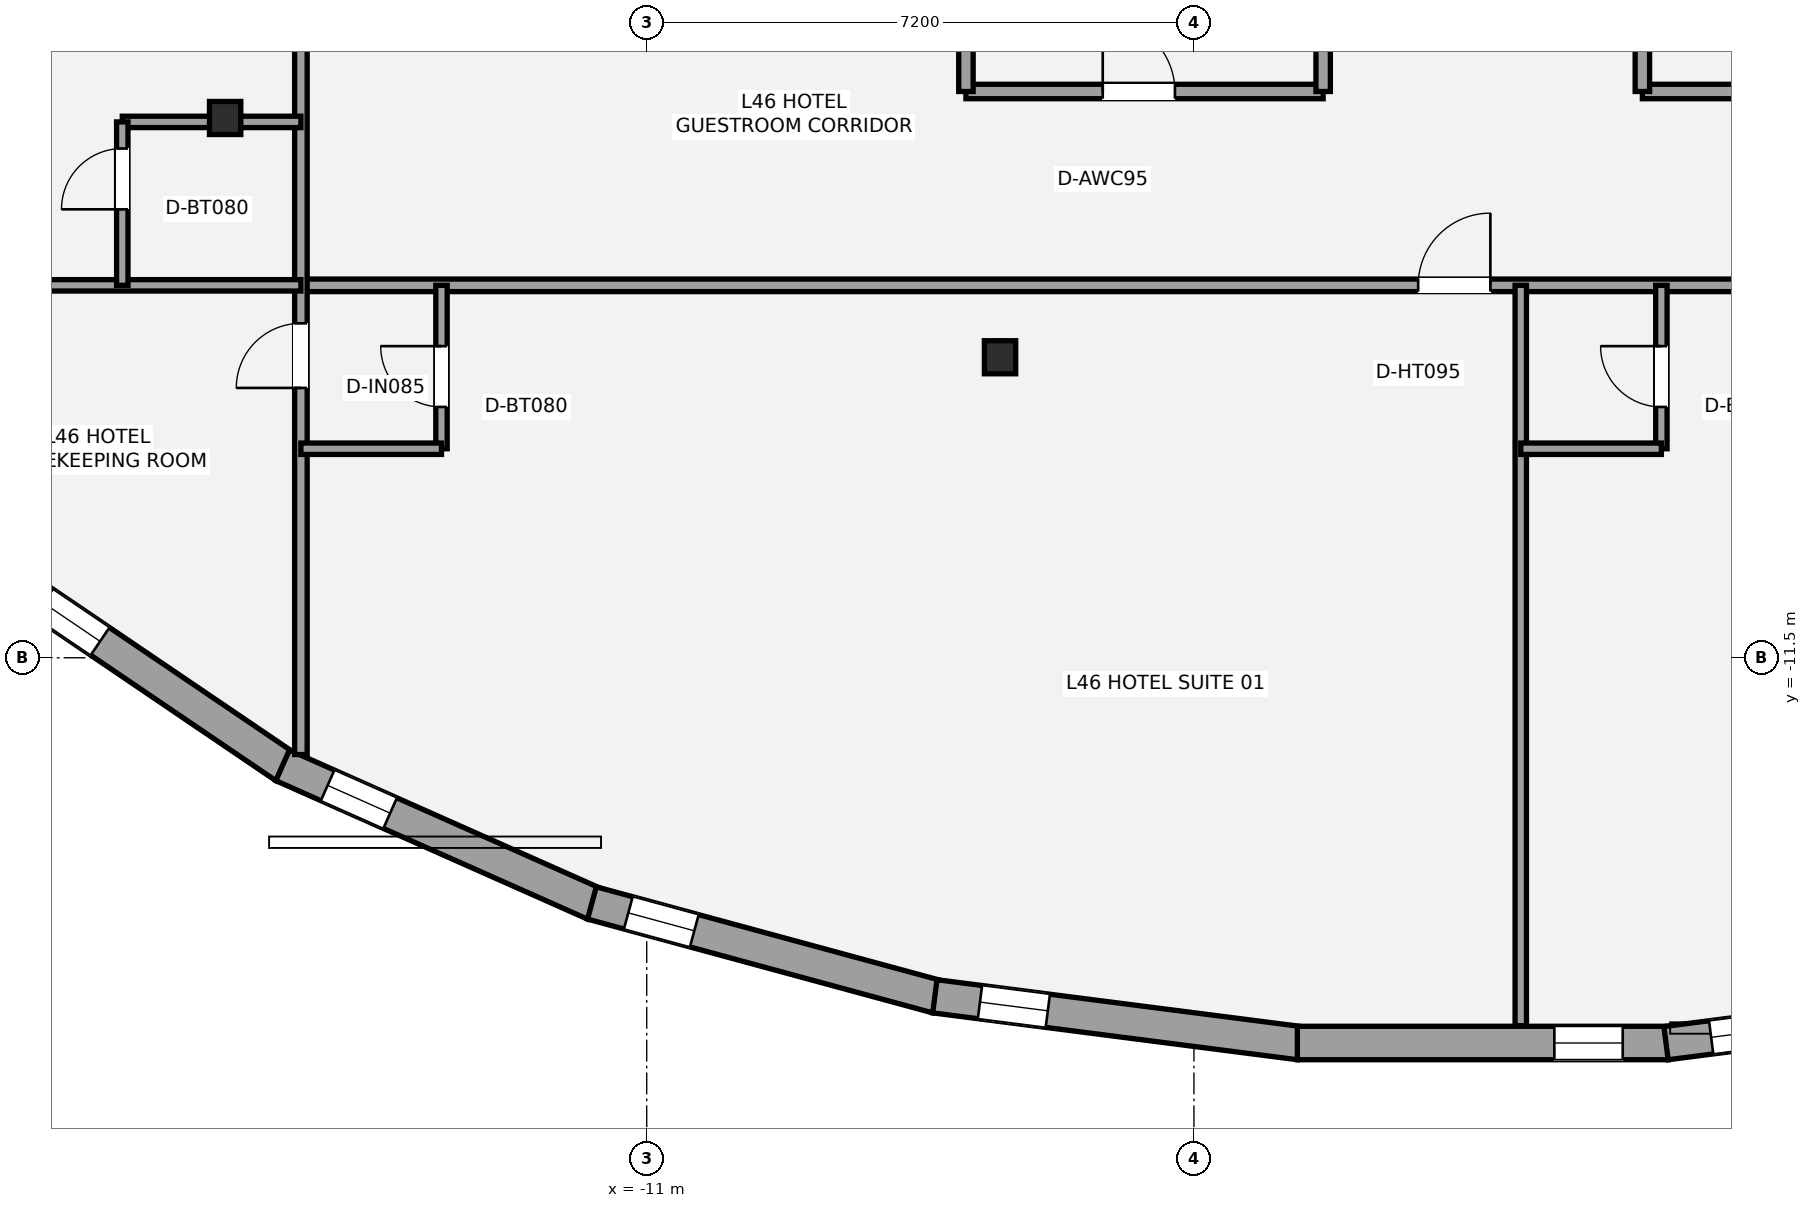
"""IFC4 building model, lengths in metres.
Left out: names, types, materials, properties, quantities, classifications, styles, units other than length and angle.
Written with IfcOpenShell. Run it as: python <this file> out.ifc"""

import sys

from ifc_helpers import new_model, si_unit, direction, frame, frame_2d, origin, origin_2d, place, context, subcontext, project, spatial, rectangle, i_section, extrude, element, fill, save


model = new_model("IFC4")
c1 = context("Model", 3, precision=1e-05, world=origin(), true_north=direction((0.0, 1.0)))
c2 = subcontext(c1, "Body", "Model", "MODEL_VIEW")
j1 = project(units=[si_unit("LENGTHUNIT", "METRE"), si_unit("PLANEANGLEUNIT", "RADIAN")], contexts=[c1])
p1 = place(None, origin())
s1 = spatial("IfcSite", under=j1, at=p1, CompositionType="ELEMENT")
p2 = place(p1, origin())
s2 = spatial("IfcBuilding", under=s1, at=p2, CompositionType="ELEMENT")
p3 = place(p2, frame((0.0, 0.0, 169.4)))
s3 = spatial("IfcBuildingStorey", under=s2, at=p3, CompositionType="ELEMENT", Elevation=169.4)
for number, where, z_axis, x_axis in (
    (1, (-16.547, -4.398, 0.0), (0.0, 0.0, 1.0), (1.0, 0.0, 0.0)),
    (2, (-6.351, -7.546, 0.0), (0.0, 0.0, 1.0), (1.0, 0.0, 0.0)),
):
    element("IfcColumn", number, at=place(p3, frame(where, z_axis=z_axis, x_axis=x_axis)), inside=s3, PredefinedType="COLUMN", context=c2, shape_type="SweptSolid", body=[
        extrude(i_section(OverallWidth=0.412, OverallDepth=0.435, WebThickness=0.036, FlangeThickness=0.057, at=origin_2d()), origin(), (0.0, 0.0, 1.0), 3.2),
    ])
p4 = place(p3, frame((-15.757, -12.935, 0.0), z_axis=(0.0, 0.0, 1.0), x_axis=(-0.827760762475, 0.561081206338, 0.0)))
e3 = element("IfcWall", 3, at=p4, inside=s3, PredefinedType="STANDARD", context=c2, shape_type="SweptSolid", body=[
    extrude(rectangle(XDim=4.192, YDim=0.44, at=frame_2d((2.096, 0.0))), origin(), (0.0, 0.0, 1.0), 2.319),
])
p5 = place(p4, frame((2.942, 0.0, 0.58)))
e4 = element("IfcOpeningElement", 4, at=p5, cuts=e3, PredefinedType="OPENING", context=c2, shape_type="SweptSolid", body=[
    extrude(rectangle(XDim=0.9, YDim=1.35, at=frame_2d((0.45, 0.675))), frame((0.0, 0.23, 0.0), z_axis=(0.0, -1.0, 0.0), x_axis=(1.0, 0.0, 0.0)), (0.0, 0.0, 1.0), 0.46),
])
p6 = place(p3, frame((-11.69, -14.737, 0.0), z_axis=(0.0, 0.0, 1.0), x_axis=(-0.913907994914, 0.405921392431, 0.0)))
e5 = element("IfcWall", 5, at=p6, inside=s3, PredefinedType="STANDARD", context=c2, shape_type="SweptSolid", body=[
    extrude(rectangle(XDim=4.487, YDim=0.44, at=frame_2d((2.244, 0.0))), origin(), (0.0, 0.0, 1.0), 2.315),
])
p7 = place(p6, frame((2.939, 0.0, 0.58)))
e6 = element("IfcOpeningElement", 6, at=p7, cuts=e5, PredefinedType="OPENING", context=c2, shape_type="SweptSolid", body=[
    extrude(rectangle(XDim=0.9, YDim=1.35, at=frame_2d((0.45, 0.675))), frame((0.0, 0.23, 0.0), z_axis=(0.0, -1.0, 0.0), x_axis=(1.0, 0.0, 0.0)), (0.0, 0.0, 1.0), 0.46),
])
p8 = place(p3, frame((-7.179, -15.959, 0.0), z_axis=(0.0, 0.0, 1.0), x_axis=(-0.965037424263, 0.262112132058, 0.0)))
e7 = element("IfcWall", 7, at=p8, inside=s3, PredefinedType="STANDARD", context=c2, shape_type="SweptSolid", body=[
    extrude(rectangle(XDim=4.707, YDim=0.44, at=frame_2d((2.353, 0.0))), origin(), (0.0, 0.0, 1.0), 2.315),
])
p9 = place(p8, frame((3.31, 0.0, 0.58)))
e8 = element("IfcOpeningElement", 8, at=p9, cuts=e7, PredefinedType="OPENING", context=c2, shape_type="SweptSolid", body=[
    extrude(rectangle(XDim=0.9, YDim=1.35, at=frame_2d((0.45, 0.675))), frame((0.0, 0.23, 0.0), z_axis=(0.0, -1.0, 0.0), x_axis=(1.0, 0.0, 0.0)), (0.0, 0.0, 1.0), 0.46),
])
p10 = place(p3, frame((-2.411, -16.57, 0.0), z_axis=(0.0, 0.0, 1.0), x_axis=(-0.991852910824, 0.127388395426, 0.0)))
e9 = element("IfcWall", 9, at=p10, inside=s3, PredefinedType="STANDARD", context=c2, shape_type="SweptSolid", body=[
    extrude(rectangle(XDim=4.837, YDim=0.44, at=frame_2d((2.418, 0.0))), origin(), (0.0, 0.0, 1.0), 2.315),
])
p11 = place(p10, frame((3.339, 0.0, 0.58)))
e10 = element("IfcOpeningElement", 10, at=p11, cuts=e9, PredefinedType="OPENING", context=c2, shape_type="SweptSolid", body=[
    extrude(rectangle(XDim=0.9, YDim=1.35, at=frame_2d((0.45, 0.675))), frame((0.0, 0.23, 0.0), z_axis=(0.0, -1.0, 0.0), x_axis=(1.0, 0.0, 0.0)), (0.0, 0.0, 1.0), 0.46),
])
p12 = place(p3, frame((2.439, -16.568, 0.0), z_axis=(0.0, 0.0, 1.0), x_axis=(-1.0, 0.0, 0.0)))
e11 = element("IfcWall", 11, at=p12, inside=s3, PredefinedType="STANDARD", context=c2, shape_type="SweptSolid", body=[
    extrude(rectangle(XDim=4.878, YDim=0.44, at=frame_2d((2.439, 0.0))), origin(), (0.0, 0.0, 1.0), 2.315),
])
p13 = place(p12, frame((0.598, 0.0, 0.58)))
e12 = element("IfcOpeningElement", 12, at=p13, cuts=e11, PredefinedType="OPENING", context=c2, shape_type="SweptSolid", body=[
    extrude(rectangle(XDim=0.9, YDim=1.35, at=frame_2d((0.45, 0.675))), frame((0.0, 0.23, 0.0), z_axis=(0.0, -1.0, 0.0), x_axis=(1.0, 0.0, 0.0)), (0.0, 0.0, 1.0), 0.46),
])
p14 = place(p3, frame((7.209, -15.954, 0.0), z_axis=(0.0, 0.0, 1.0), x_axis=(-0.991852910824, -0.127388395426, 0.0)))
e13 = element("IfcWall", 13, at=p14, inside=s3, PredefinedType="STANDARD", context=c2, shape_type="SweptSolid", body=[
    extrude(rectangle(XDim=4.837, YDim=0.44, at=frame_2d((2.418, 0.0))), origin(), (0.0, 0.0, 1.0), 2.315),
])
p15 = place(p14, frame((3.339, 0.0, 0.58)))
e14 = element("IfcOpeningElement", 14, at=p15, cuts=e13, PredefinedType="OPENING", context=c2, shape_type="SweptSolid", body=[
    extrude(rectangle(XDim=0.9, YDim=1.35, at=frame_2d((0.45, 0.675))), frame((0.0, 0.23, 0.0), z_axis=(0.0, -1.0, 0.0), x_axis=(1.0, 0.0, 0.0)), (0.0, 0.0, 1.0), 0.46),
])
p16 = place(p3, frame((-6.8, -4.05, 0.0), z_axis=(0.0, 0.0, 1.0), x_axis=(1.0, 0.0, 0.0)))
e15 = element("IfcWall", 15, at=p16, inside=s3, PredefinedType="PLUMBINGWALL", context=c2, shape_type="SweptSolid", body=[
    extrude(rectangle(XDim=4.7, YDim=0.19, at=frame_2d((2.35, 0.0))), origin(), (0.0, 0.0, 1.0), 3.02),
])
p17 = place(p16, frame((1.8, 0.0, 0.0)))
e16 = element("IfcOpeningElement", 16, at=p17, cuts=e15, PredefinedType="OPENING", context=c2, shape_type="SweptSolid", body=[
    extrude(rectangle(XDim=0.95, YDim=2.15, at=frame_2d((0.475, 1.075))), frame((0.0, 0.105, 0.0), z_axis=(0.0, -1.0, 0.0), x_axis=(1.0, 0.0, 0.0)), (0.0, 0.0, 1.0), 0.21),
])
p18 = place(p3, frame((-6.8, -4.05, 0.0), z_axis=(0.0, 0.0, 1.0), x_axis=(0.0, 1.0, 0.0)))
e17 = element("IfcWall", 17, at=p18, inside=s3, PredefinedType="PLUMBINGWALL", context=c2, shape_type="SweptSolid", body=[
    extrude(rectangle(XDim=1.9, YDim=0.19, at=frame_2d((0.95, 0.0))), origin(), (0.0, 0.0, 1.0), 2.473),
])
p19 = place(p3, frame((-2.1, -4.05, 0.0), z_axis=(0.0, 0.0, 1.0), x_axis=(0.0, 1.0, 0.0)))
e18 = element("IfcWall", 18, at=p19, inside=s3, PredefinedType="PLUMBINGWALL", context=c2, shape_type="SweptSolid", body=[
    extrude(rectangle(XDim=1.9, YDim=0.19, at=frame_2d((0.95, 0.0))), origin(), (0.0, 0.0, 1.0), 3.02),
])
p20 = place(p3, frame((2.1, -4.05, 0.0), z_axis=(0.0, 0.0, 1.0), x_axis=(1.0, 0.0, 0.0)))
e19 = element("IfcWall", 19, at=p20, inside=s3, PredefinedType="PLUMBINGWALL", context=c2, shape_type="SweptSolid", body=[
    extrude(rectangle(XDim=11.35, YDim=0.19, at=frame_2d((5.675, 0.0))), origin(), (0.0, 0.0, 1.0), 3.02),
])
p21 = place(p20, frame((5.2, 0.0, 0.0)))
e20 = element("IfcOpeningElement", 20, at=p21, cuts=e19, PredefinedType="OPENING", context=c2, shape_type="SweptSolid", body=[
    extrude(rectangle(XDim=0.9, YDim=2.1, at=frame_2d((0.45, 1.05))), frame((0.0, 0.105, 0.0), z_axis=(0.0, -1.0, 0.0), x_axis=(1.0, 0.0, 0.0)), (0.0, 0.0, 1.0), 0.21),
])
p22 = place(p3, frame((2.1, -4.05, 0.0), z_axis=(0.0, 0.0, 1.0), x_axis=(0.0, 1.0, 0.0)))
e21 = element("IfcWall", 21, at=p22, inside=s3, PredefinedType="PLUMBINGWALL", context=c2, shape_type="SweptSolid", body=[
    extrude(rectangle(XDim=1.9, YDim=0.19, at=frame_2d((0.95, 0.0))), origin(), (0.0, 0.0, 1.0), 3.02),
])
p23 = place(p3, frame((-15.55, -6.6, 0.0), z_axis=(0.0, 0.0, 1.0), x_axis=(1.0, 0.0, 0.0)))
e22 = element("IfcWall", 22, at=p23, inside=s3, PredefinedType="PARTITIONING", context=c2, shape_type="SweptSolid", body=[
    extrude(rectangle(XDim=31.65, YDim=0.165, at=frame_2d((15.825, 0.0))), origin(), (0.0, 0.0, 1.0), 2.398),
])
p24 = place(p23, frame((14.7, 0.0, 0.0)))
e23 = element("IfcOpeningElement", 23, at=p24, cuts=e22, PredefinedType="OPENING", context=c2, shape_type="SweptSolid", body=[
    extrude(rectangle(XDim=0.95, YDim=2.15, at=frame_2d((0.475, 1.075))), frame((0.0, 0.093, 0.0), z_axis=(0.0, -1.0, 0.0), x_axis=(1.0, 0.0, 0.0)), (0.0, 0.0, 1.0), 0.185),
])
p25 = place(p23, frame((30.3, 0.0, 0.0)))
e24 = element("IfcOpeningElement", 24, at=p25, cuts=e22, PredefinedType="OPENING", context=c2, shape_type="SweptSolid", body=[
    extrude(rectangle(XDim=0.95, YDim=2.15, at=frame_2d((0.475, 1.075))), frame((0.0, 0.093, 0.0), z_axis=(0.0, -1.0, 0.0), x_axis=(1.0, 0.0, 0.0)), (0.0, 0.0, 1.0), 0.185),
])
p26 = place(p3, frame((-15.55, -12.773, 0.0), z_axis=(0.0, 0.0, 1.0), x_axis=(0.0, 1.0, 0.0)))
e25 = element("IfcWall", 25, at=p26, inside=s3, PredefinedType="PARTITIONING", context=c2, shape_type="SweptSolid", body=[
    extrude(rectangle(XDim=20.323, YDim=0.165, at=frame_2d((10.162, 0.0))), origin(), (0.0, 0.0, 1.0), 2.473),
])
p27 = place(p26, frame((4.823, 0.0, 0.0)))
e26 = element("IfcOpeningElement", 26, at=p27, cuts=e25, PredefinedType="OPENING", context=c2, shape_type="SweptSolid", body=[
    extrude(rectangle(XDim=0.85, YDim=2.1, at=frame_2d((0.425, 1.05))), frame((0.0, 0.093, 0.0), z_axis=(0.0, -1.0, 0.0), x_axis=(1.0, 0.0, 0.0)), (0.0, 0.0, 1.0), 0.185),
])
p28 = place(p26, frame((9.623, 0.0, 0.0)))
e27 = element("IfcOpeningElement", 27, at=p28, cuts=e25, PredefinedType="OPENING", context=c2, shape_type="SweptSolid", body=[
    extrude(rectangle(XDim=0.95, YDim=2.15, at=frame_2d((0.475, 1.075))), frame((0.0, 0.093, 0.0), z_axis=(0.0, -1.0, 0.0), x_axis=(1.0, 0.0, 0.0)), (0.0, 0.0, 1.0), 0.185),
])
p29 = place(p26, frame((14.223, 0.0, 0.0)))
e28 = element("IfcOpeningElement", 28, at=p29, cuts=e25, PredefinedType="OPENING", context=c2, shape_type="SweptSolid", body=[
    extrude(rectangle(XDim=0.95, YDim=2.15, at=frame_2d((0.475, 1.075))), frame((0.0, 0.093, 0.0), z_axis=(0.0, -1.0, 0.0), x_axis=(1.0, 0.0, 0.0)), (0.0, 0.0, 1.0), 0.185),
])
p30 = place(p26, frame((18.973, 0.0, 0.0)))
e29 = element("IfcOpeningElement", 29, at=p30, cuts=e25, PredefinedType="OPENING", context=c2, shape_type="SweptSolid", body=[
    extrude(rectangle(XDim=0.95, YDim=2.15, at=frame_2d((0.475, 1.075))), frame((0.0, 0.093, 0.0), z_axis=(0.0, -1.0, 0.0), x_axis=(1.0, 0.0, 0.0)), (0.0, 0.0, 1.0), 0.185),
])
p31 = place(p3, frame((-22.335, -6.6, 0.0), z_axis=(0.0, 0.0, 1.0), x_axis=(1.0, 0.0, 0.0)))
e30 = element("IfcWall", 30, at=p31, inside=s3, PredefinedType="PLUMBINGWALL", context=c2, shape_type="SweptSolid", body=[
    extrude(rectangle(XDim=6.785, YDim=0.15, at=frame_2d((3.392, 0.0))), origin(), (0.0, 0.0, 1.0), 2.473),
])
p32 = place(p3, frame((0.5, -16.34, 0.0), z_axis=(0.0, 0.0, 1.0), x_axis=(0.0, 1.0, 0.0)))
e31 = element("IfcWall", 31, at=p32, inside=s3, PredefinedType="PLUMBINGWALL", context=c2, shape_type="SweptSolid", body=[
    extrude(rectangle(XDim=9.74, YDim=0.15, at=frame_2d((4.87, 0.0))), origin(), (0.0, 0.0, 1.0), 2.473),
])
p33 = place(p3, frame((-13.7, -8.75, 0.0), z_axis=(0.0, 0.0, 1.0), x_axis=(0.0, 1.0, 0.0)))
e32 = element("IfcWall", 32, at=p33, inside=s3, PredefinedType="PLUMBINGWALL", context=c2, shape_type="SweptSolid", body=[
    extrude(rectangle(XDim=2.15, YDim=0.15, at=frame_2d((1.075, 0.0))), origin(), (0.0, 0.0, 1.0), 3.02),
])
p34 = place(p33, frame((0.55, 0.0, 0.0)))
e33 = element("IfcOpeningElement", 33, at=p34, cuts=e32, PredefinedType="OPENING", context=c2, shape_type="SweptSolid", body=[
    extrude(rectangle(XDim=0.8, YDim=2.1, at=frame_2d((0.4, 1.05))), frame((0.0, 0.085, 0.0), z_axis=(0.0, -1.0, 0.0), x_axis=(1.0, 0.0, 0.0)), (0.0, 0.0, 1.0), 0.17),
])
p35 = place(p3, frame((-15.55, -8.75, 0.0), z_axis=(0.0, 0.0, 1.0), x_axis=(1.0, 0.0, 0.0)))
e34 = element("IfcWall", 34, at=p35, inside=s3, PredefinedType="PLUMBINGWALL", context=c2, shape_type="SweptSolid", body=[
    extrude(rectangle(XDim=1.85, YDim=0.15, at=frame_2d((0.925, 0.0))), origin(), (0.0, 0.0, 1.0), 2.473),
])
p36 = place(p3, frame((2.35, -8.75, 0.0), z_axis=(0.0, 0.0, 1.0), x_axis=(0.0, 1.0, 0.0)))
e35 = element("IfcWall", 35, at=p36, inside=s3, PredefinedType="PLUMBINGWALL", context=c2, shape_type="SweptSolid", body=[
    extrude(rectangle(XDim=2.15, YDim=0.15, at=frame_2d((1.075, 0.0))), origin(), (0.0, 0.0, 1.0), 2.473),
])
p37 = place(p36, frame((0.55, 0.0, 0.0)))
e36 = element("IfcOpeningElement", 36, at=p37, cuts=e35, PredefinedType="OPENING", context=c2, shape_type="SweptSolid", body=[
    extrude(rectangle(XDim=0.8, YDim=2.1, at=frame_2d((0.4, 1.05))), frame((0.0, 0.085, 0.0), z_axis=(0.0, -1.0, 0.0), x_axis=(1.0, 0.0, 0.0)), (0.0, 0.0, 1.0), 0.17),
])
p38 = place(p3, frame((0.5, -8.75, 0.0), z_axis=(0.0, 0.0, 1.0), x_axis=(1.0, 0.0, 0.0)))
e37 = element("IfcWall", 37, at=p38, inside=s3, PredefinedType="PLUMBINGWALL", context=c2, shape_type="SweptSolid", body=[
    extrude(rectangle(XDim=1.85, YDim=0.15, at=frame_2d((0.925, 0.0))), origin(), (0.0, 0.0, 1.0), 2.473),
])
p39 = place(p3, frame((-17.9, -4.45, 0.0), z_axis=(0.0, 0.0, 1.0), x_axis=(1.0, 0.0, 0.0)))
e38 = element("IfcWall", 38, at=p39, inside=s3, PredefinedType="PLUMBINGWALL", context=c2, shape_type="SweptSolid", body=[
    extrude(rectangle(XDim=2.35, YDim=0.15, at=frame_2d((1.175, 0.0))), origin(), (0.0, 0.0, 1.0), 2.398),
])
p40 = place(p3, frame((-17.9, -6.6, 0.0), z_axis=(0.0, 0.0, 1.0), x_axis=(0.0, 1.0, 0.0)))
e39 = element("IfcWall", 39, at=p40, inside=s3, PredefinedType="PLUMBINGWALL", context=c2, shape_type="SweptSolid", body=[
    extrude(rectangle(XDim=2.15, YDim=0.15, at=frame_2d((1.075, 0.0))), origin(), (0.0, 0.0, 1.0), 2.473),
])
p41 = place(p40, frame((1.0, 0.0, 0.0)))
e40 = element("IfcOpeningElement", 40, at=p41, cuts=e39, PredefinedType="OPENING", context=c2, shape_type="SweptSolid", body=[
    extrude(rectangle(XDim=0.8, YDim=2.1, at=frame_2d((0.4, 1.05))), frame((0.0, 0.085, 0.0), z_axis=(0.0, -1.0, 0.0), x_axis=(1.0, 0.0, 0.0)), (0.0, 0.0, 1.0), 0.17),
])
p42 = place(p5, origin())
e41 = element("IfcWindow", 41, at=p42, inside=s3, PartitioningType="SINGLE_PANEL", PredefinedType="WINDOW", context=c2, shape_type="SweptSolid", body=[
    extrude(rectangle(XDim=0.9, YDim=1.35, at=frame_2d((0.45, 0.675))), frame((0.0, -0.01, 0.0), z_axis=(0.0, -1.0, 0.0), x_axis=(1.0, 0.0, 0.0)), (0.0, 0.0, 1.0), 0.06),
])
fill(e4, e41)
p43 = place(p7, origin())
e42 = element("IfcWindow", 42, at=p43, inside=s3, PartitioningType="SINGLE_PANEL", PredefinedType="WINDOW", context=c2, shape_type="SweptSolid", body=[
    extrude(rectangle(XDim=0.9, YDim=1.35, at=frame_2d((0.45, 0.675))), frame((0.0, -0.01, 0.0), z_axis=(0.0, -1.0, 0.0), x_axis=(1.0, 0.0, 0.0)), (0.0, 0.0, 1.0), 0.06),
])
fill(e6, e42)
p44 = place(p9, origin())
e43 = element("IfcWindow", 43, at=p44, inside=s3, PartitioningType="SINGLE_PANEL", PredefinedType="WINDOW", context=c2, shape_type="SweptSolid", body=[
    extrude(rectangle(XDim=0.9, YDim=1.35, at=frame_2d((0.45, 0.675))), frame((0.0, -0.01, 0.0), z_axis=(0.0, -1.0, 0.0), x_axis=(1.0, 0.0, 0.0)), (0.0, 0.0, 1.0), 0.06),
])
fill(e8, e43)
p45 = place(p11, origin())
e44 = element("IfcWindow", 44, at=p45, inside=s3, PartitioningType="SINGLE_PANEL", PredefinedType="WINDOW", context=c2, shape_type="SweptSolid", body=[
    extrude(rectangle(XDim=0.9, YDim=1.35, at=frame_2d((0.45, 0.675))), frame((0.0, -0.01, 0.0), z_axis=(0.0, -1.0, 0.0), x_axis=(1.0, 0.0, 0.0)), (0.0, 0.0, 1.0), 0.06),
])
fill(e10, e44)
p46 = place(p13, origin())
e45 = element("IfcWindow", 45, at=p46, inside=s3, PartitioningType="SINGLE_PANEL", PredefinedType="WINDOW", context=c2, shape_type="SweptSolid", body=[
    extrude(rectangle(XDim=0.9, YDim=1.35, at=frame_2d((0.45, 0.675))), frame((0.0, -0.01, 0.0), z_axis=(0.0, -1.0, 0.0), x_axis=(1.0, 0.0, 0.0)), (0.0, 0.0, 1.0), 0.06),
])
fill(e12, e45)
p47 = place(p15, origin())
e46 = element("IfcWindow", 46, at=p47, inside=s3, PartitioningType="SINGLE_PANEL", PredefinedType="WINDOW", context=c2, shape_type="SweptSolid", body=[
    extrude(rectangle(XDim=0.9, YDim=1.35, at=frame_2d((0.45, 0.675))), frame((0.0, -0.01, 0.0), z_axis=(0.0, -1.0, 0.0), x_axis=(1.0, 0.0, 0.0)), (0.0, 0.0, 1.0), 0.06),
])
fill(e14, e46)
p48 = place(p17, origin())
e47 = element("IfcDoor", 47, at=p48, inside=s3, OperationType="SINGLE_SWING_LEFT", PredefinedType="DOOR", context=c2, shape_type="SweptSolid", body=[
    extrude(rectangle(XDim=0.95, YDim=2.15, at=frame_2d((0.475, 1.075))), frame((0.0, 0.025, 0.0), z_axis=(0.0, -1.0, 0.0), x_axis=(1.0, 0.0, 0.0)), (0.0, 0.0, 1.0), 0.05),
])
fill(e16, e47)
p49 = place(p27, origin())
e48 = element("IfcDoor", 48, at=p49, inside=s3, OperationType="SINGLE_SWING_LEFT", PredefinedType="DOOR", context=c2, shape_type="SweptSolid", body=[
    extrude(rectangle(XDim=0.85, YDim=2.1, at=frame_2d((0.425, 1.05))), frame((0.0, 0.025, 0.0), z_axis=(0.0, -1.0, 0.0), x_axis=(1.0, 0.0, 0.0)), (0.0, 0.0, 1.0), 0.05),
])
fill(e26, e48)
p50 = place(p24, origin())
e49 = element("IfcDoor", 49, at=p50, inside=s3, OperationType="SINGLE_SWING_RIGHT", PredefinedType="DOOR", context=c2, shape_type="SweptSolid", body=[
    extrude(rectangle(XDim=0.95, YDim=2.15, at=frame_2d((0.475, 1.075))), frame((0.0, 0.025, 0.0), z_axis=(0.0, -1.0, 0.0), x_axis=(1.0, 0.0, 0.0)), (0.0, 0.0, 1.0), 0.05),
])
fill(e23, e49)
p51 = place(p34, origin())
e50 = element("IfcDoor", 50, at=p51, inside=s3, OperationType="SINGLE_SWING_RIGHT", PredefinedType="DOOR", context=c2, shape_type="SweptSolid", body=[
    extrude(rectangle(XDim=0.8, YDim=2.1, at=frame_2d((0.4, 1.05))), frame((0.0, 0.025, 0.0), z_axis=(0.0, -1.0, 0.0), x_axis=(1.0, 0.0, 0.0)), (0.0, 0.0, 1.0), 0.05),
])
fill(e33, e50)
p52 = place(p37, origin())
e51 = element("IfcDoor", 51, at=p52, inside=s3, OperationType="SINGLE_SWING_RIGHT", PredefinedType="DOOR", context=c2, shape_type="SweptSolid", body=[
    extrude(rectangle(XDim=0.8, YDim=2.1, at=frame_2d((0.4, 1.05))), frame((0.0, 0.025, 0.0), z_axis=(0.0, -1.0, 0.0), x_axis=(1.0, 0.0, 0.0)), (0.0, 0.0, 1.0), 0.05),
])
fill(e36, e51)
p53 = place(p41, origin())
e52 = element("IfcDoor", 52, at=p53, inside=s3, OperationType="SINGLE_SWING_LEFT", PredefinedType="DOOR", context=c2, shape_type="SweptSolid", body=[
    extrude(rectangle(XDim=0.8, YDim=2.1, at=frame_2d((0.4, 1.05))), frame((0.0, 0.025, 0.0), z_axis=(0.0, -1.0, 0.0), x_axis=(1.0, 0.0, 0.0)), (0.0, 0.0, 1.0), 0.05),
])
fill(e40, e52)
save(model, sys.argv[1])
